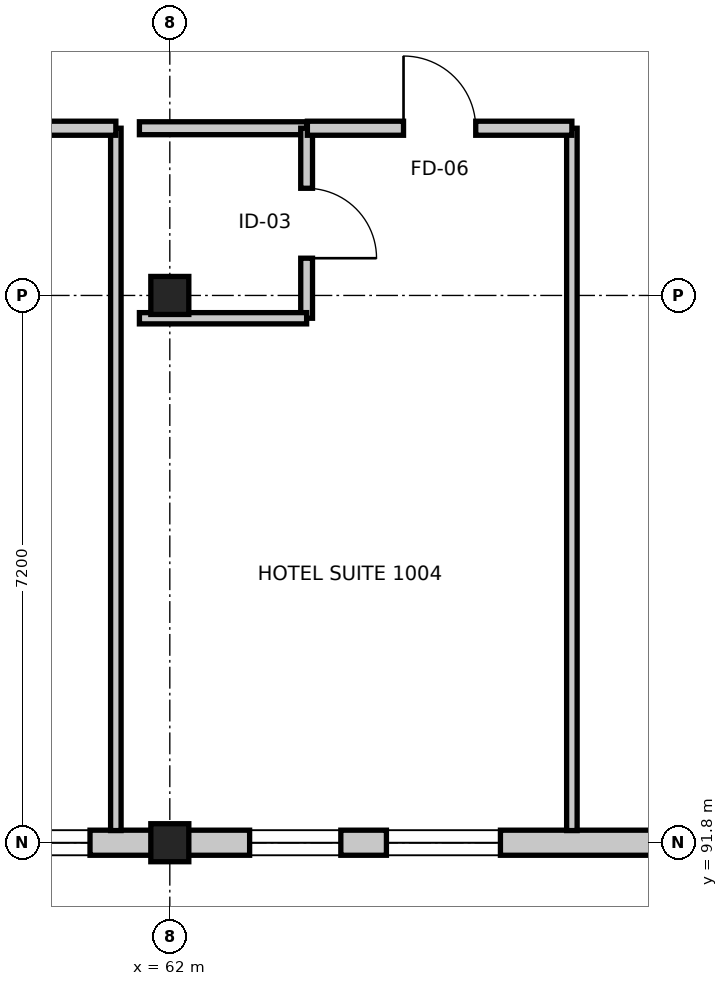
"""IFC4 building model, lengths in metres.
Left out: names, types, materials, properties, quantities, classifications, styles, units other than length and angle.
Written with IfcOpenShell. Run it as: python <this file> out.ifc"""

import sys

from ifc_helpers import new_model, si_unit, direction, frame, frame_2d, origin, origin_2d, place, context, subcontext, project, spatial, rectangle, extrude, element, fill, save


model = new_model("IFC4")
c1 = context("Model", 3, precision=1e-05, world=origin(), true_north=direction((0.0, 1.0)))
c2 = subcontext(c1, "Body", "Model", "MODEL_VIEW")
j1 = project(units=[si_unit("LENGTHUNIT", "METRE"), si_unit("PLANEANGLEUNIT", "RADIAN")], contexts=[c1])
p1 = place(None, origin())
s1 = spatial("IfcSite", under=j1, at=p1, CompositionType="ELEMENT")
p2 = place(p1, origin())
s2 = spatial("IfcBuilding", under=s1, at=p2, CompositionType="ELEMENT")
p3 = place(p2, frame((0.0, 0.0, 40.8)))
s3 = spatial("IfcBuildingStorey", under=s2, at=p3, CompositionType="ELEMENT", Elevation=40.8)
for number, where, z_axis, x_axis in (
    (1, (62.0, 91.8, 0.0), (0.0, 0.0, 1.0), (1.0, 0.0, 0.0)),
    (2, (62.0, 99.0, 0.0), (0.0, 0.0, 1.0), (1.0, 0.0, 0.0)),
):
    element("IfcColumn", number, at=place(p3, frame(where, z_axis=z_axis, x_axis=x_axis)), inside=s3, PredefinedType="COLUMN", context=c2, shape_type="SweptSolid", body=[
        extrude(rectangle(XDim=0.5, YDim=0.5, at=origin_2d()), origin(), (0.0, 0.0, 1.0), 3.6),
    ])
p4 = place(p3, frame((69.2, 91.8, 0.0), z_axis=(0.0, 0.0, 1.0), x_axis=(-1.0, 0.0, 0.0)))
e3 = element("IfcWall", 3, at=p4, inside=s3, PredefinedType="STANDARD", context=c2, shape_type="SweptSolid", body=[
    extrude(rectangle(XDim=7.2, YDim=0.33, at=frame_2d((3.6, 0.0))), origin(), (0.0, 0.0, 1.0), 2.765),
])
p5 = place(p4, frame((2.85, 0.0, 0.75)))
e4 = element("IfcOpeningElement", 4, at=p5, cuts=e3, PredefinedType="OPENING", context=c2, shape_type="SweptSolid", body=[
    extrude(rectangle(XDim=1.5, YDim=1.5, at=frame_2d((0.75, 0.75))), frame((0.0, 0.175, 0.0), z_axis=(0.0, -1.0, 0.0), x_axis=(1.0, 0.0, 0.0)), (0.0, 0.0, 1.0), 0.35),
])
p6 = place(p4, frame((4.95, 0.0, 0.85)))
e5 = element("IfcOpeningElement", 5, at=p6, cuts=e3, PredefinedType="OPENING", context=c2, shape_type="SweptSolid", body=[
    extrude(rectangle(XDim=1.2, YDim=1.8, at=frame_2d((0.6, 0.9))), frame((0.0, 0.175, 0.0), z_axis=(0.0, -1.0, 0.0), x_axis=(1.0, 0.0, 0.0)), (0.0, 0.0, 1.0), 0.35),
])
p7 = place(p3, frame((62.0, 91.8, 0.0), z_axis=(0.0, 0.0, 1.0), x_axis=(-1.0, 0.0, 0.0)))
e6 = element("IfcWall", 6, at=p7, inside=s3, PredefinedType="STANDARD", context=c2, shape_type="SweptSolid", body=[
    extrude(rectangle(XDim=7.2, YDim=0.33, at=frame_2d((3.6, 0.0))), origin(), (0.0, 0.0, 1.0), 2.765),
])
p8 = place(p7, frame((2.85, 0.0, 0.75)))
e7 = element("IfcOpeningElement", 7, at=p8, cuts=e6, PredefinedType="OPENING", context=c2, shape_type="SweptSolid", body=[
    extrude(rectangle(XDim=1.5, YDim=1.5, at=frame_2d((0.75, 0.75))), frame((0.0, 0.175, 0.0), z_axis=(0.0, -1.0, 0.0), x_axis=(1.0, 0.0, 0.0)), (0.0, 0.0, 1.0), 0.35),
])
p9 = place(p7, frame((1.05, 0.0, 0.85)))
e8 = element("IfcOpeningElement", 8, at=p9, cuts=e6, PredefinedType="OPENING", context=c2, shape_type="SweptSolid", body=[
    extrude(rectangle(XDim=1.2, YDim=1.8, at=frame_2d((0.6, 0.9))), frame((0.0, 0.175, 0.0), z_axis=(0.0, -1.0, 0.0), x_axis=(1.0, 0.0, 0.0)), (0.0, 0.0, 1.0), 0.35),
])
p10 = place(p7, frame((4.95, 0.0, 0.85)))
e9 = element("IfcOpeningElement", 9, at=p10, cuts=e6, PredefinedType="OPENING", context=c2, shape_type="SweptSolid", body=[
    extrude(rectangle(XDim=1.2, YDim=1.8, at=frame_2d((0.6, 0.9))), frame((0.0, 0.175, 0.0), z_axis=(0.0, -1.0, 0.0), x_axis=(1.0, 0.0, 0.0)), (0.0, 0.0, 1.0), 0.35),
])
p11 = place(p3, frame((61.29, 101.2, 0.0), z_axis=(0.0, 0.0, 1.0), x_axis=(0.0, -1.0, 0.0)))
e10 = element("IfcWall", 10, at=p11, inside=s3, PredefinedType="PARTITIONING", context=c2, shape_type="SweptSolid", body=[
    extrude(rectangle(XDim=9.24, YDim=0.138, at=frame_2d((4.62, 0.0))), origin(), (0.0, 0.0, 1.0), 2.765),
])
p12 = place(p3, frame((57.81, 101.2, 0.0), z_axis=(0.0, 0.0, 1.0), x_axis=(1.0, 0.0, 0.0)))
e11 = element("IfcWall", 11, at=p12, inside=s3, PredefinedType="PARTITIONING", context=c2, shape_type="SweptSolid", body=[
    extrude(rectangle(XDim=3.48, YDim=0.185, at=frame_2d((1.74, 0.0))), origin(), (0.0, 0.0, 1.0), 3.38),
])
p13 = place(p12, frame((1.21, 0.0, 0.0)))
e12 = element("IfcOpeningElement", 12, at=p13, cuts=e11, PredefinedType="OPENING", context=c2, shape_type="SweptSolid", body=[
    extrude(rectangle(XDim=1.06, YDim=2.2, at=frame_2d((0.53, 1.1))), frame((0.0, 0.103, 0.0), z_axis=(0.0, -1.0, 0.0), x_axis=(1.0, 0.0, 0.0)), (0.0, 0.0, 1.0), 0.205),
])
p14 = place(p3, frame((61.6, 101.2, 0.0), z_axis=(0.0, 0.0, 1.0), x_axis=(1.0, 0.0, 0.0)))
e13 = element("IfcWall", 13, at=p14, inside=s3, PredefinedType="PARTITIONING", context=c2, shape_type="SweptSolid", body=[
    extrude(rectangle(XDim=2.2, YDim=0.17, at=frame_2d((1.1, 0.0))), origin(), (0.0, 0.0, 1.0), 2.715),
])
p15 = place(p3, frame((63.8, 101.2, 0.0), z_axis=(0.0, 0.0, 1.0), x_axis=(0.0, -1.0, 0.0)))
e14 = element("IfcWall", 14, at=p15, inside=s3, PredefinedType="PARTITIONING", context=c2, shape_type="SweptSolid", body=[
    extrude(rectangle(XDim=2.5, YDim=0.155, at=frame_2d((1.25, 0.0))), origin(), (0.0, 0.0, 1.0), 2.765),
])
p16 = place(p15, frame((0.79, 0.0, 0.0)))
e15 = element("IfcOpeningElement", 15, at=p16, cuts=e14, PredefinedType="OPENING", context=c2, shape_type="SweptSolid", body=[
    extrude(rectangle(XDim=0.92, YDim=2.1, at=frame_2d((0.46, 1.05))), frame((0.0, 0.087, 0.0), z_axis=(0.0, -1.0, 0.0), x_axis=(1.0, 0.0, 0.0)), (0.0, 0.0, 1.0), 0.175),
])
p17 = place(p3, frame((63.8, 98.7, 0.0), z_axis=(0.0, 0.0, 1.0), x_axis=(-1.0, 0.0, 0.0)))
e16 = element("IfcWall", 16, at=p17, inside=s3, PredefinedType="PARTITIONING", context=c2, shape_type="SweptSolid", body=[
    extrude(rectangle(XDim=2.2, YDim=0.148, at=frame_2d((1.1, 0.0))), origin(), (0.0, 0.0, 1.0), 2.715),
])
p18 = place(p3, frame((67.29, 101.2, 0.0), z_axis=(0.0, 0.0, 1.0), x_axis=(0.0, -1.0, 0.0)))
e17 = element("IfcWall", 17, at=p18, inside=s3, PredefinedType="PARTITIONING", context=c2, shape_type="SweptSolid", body=[
    extrude(rectangle(XDim=9.24, YDim=0.138, at=frame_2d((4.62, 0.0))), origin(), (0.0, 0.0, 1.0), 2.765),
])
p19 = place(p3, frame((63.81, 101.2, 0.0), z_axis=(0.0, 0.0, 1.0), x_axis=(1.0, 0.0, 0.0)))
e18 = element("IfcWall", 18, at=p19, inside=s3, PredefinedType="PARTITIONING", context=c2, shape_type="SweptSolid", body=[
    extrude(rectangle(XDim=3.48, YDim=0.185, at=frame_2d((1.74, 0.0))), origin(), (0.0, 0.0, 1.0), 3.38),
])
p20 = place(p19, frame((1.265, 0.0, 0.0)))
e19 = element("IfcOpeningElement", 19, at=p20, cuts=e18, PredefinedType="OPENING", context=c2, shape_type="SweptSolid", body=[
    extrude(rectangle(XDim=0.95, YDim=2.1, at=frame_2d((0.475, 1.05))), frame((0.0, 0.103, 0.0), z_axis=(0.0, -1.0, 0.0), x_axis=(1.0, 0.0, 0.0)), (0.0, 0.0, 1.0), 0.205),
])
p21 = place(p5, origin())
e20 = element("IfcWindow", 20, at=p21, inside=s3, PartitioningType="SINGLE_PANEL", PredefinedType="WINDOW", context=c2, shape_type="SweptSolid", body=[
    extrude(rectangle(XDim=1.5, YDim=1.5, at=frame_2d((0.75, 0.75))), frame((0.0, 0.03, 0.0), z_axis=(0.0, -1.0, 0.0), x_axis=(1.0, 0.0, 0.0)), (0.0, 0.0, 1.0), 0.06),
])
fill(e4, e20)
p22 = place(p6, origin())
e21 = element("IfcWindow", 21, at=p22, inside=s3, PartitioningType="SINGLE_PANEL", PredefinedType="WINDOW", context=c2, shape_type="SweptSolid", body=[
    extrude(rectangle(XDim=1.2, YDim=1.8, at=frame_2d((0.6, 0.9))), frame((0.0, 0.03, 0.0), z_axis=(0.0, -1.0, 0.0), x_axis=(1.0, 0.0, 0.0)), (0.0, 0.0, 1.0), 0.06),
])
fill(e5, e21)
p23 = place(p9, origin())
e22 = element("IfcWindow", 22, at=p23, inside=s3, PartitioningType="SINGLE_PANEL", PredefinedType="WINDOW", context=c2, shape_type="SweptSolid", body=[
    extrude(rectangle(XDim=1.2, YDim=1.8, at=frame_2d((0.6, 0.9))), frame((0.0, 0.03, 0.0), z_axis=(0.0, -1.0, 0.0), x_axis=(1.0, 0.0, 0.0)), (0.0, 0.0, 1.0), 0.06),
])
fill(e8, e22)
p24 = place(p16, origin())
e23 = element("IfcDoor", 23, at=p24, inside=s3, OperationType="SINGLE_SWING_RIGHT", PredefinedType="DOOR", context=c2, shape_type="SweptSolid", body=[
    extrude(rectangle(XDim=0.92, YDim=2.1, at=frame_2d((0.46, 1.05))), frame((0.0, 0.025, 0.0), z_axis=(0.0, -1.0, 0.0), x_axis=(1.0, 0.0, 0.0)), (0.0, 0.0, 1.0), 0.05),
])
fill(e15, e23)
p25 = place(p20, origin())
e24 = element("IfcDoor", 24, at=p25, inside=s3, OperationType="SINGLE_SWING_LEFT", PredefinedType="DOOR", context=c2, shape_type="SweptSolid", body=[
    extrude(rectangle(XDim=0.95, YDim=2.1, at=frame_2d((0.475, 1.05))), frame((0.0, 0.025, 0.0), z_axis=(0.0, -1.0, 0.0), x_axis=(1.0, 0.0, 0.0)), (0.0, 0.0, 1.0), 0.05),
])
fill(e19, e24)
save(model, sys.argv[1])
